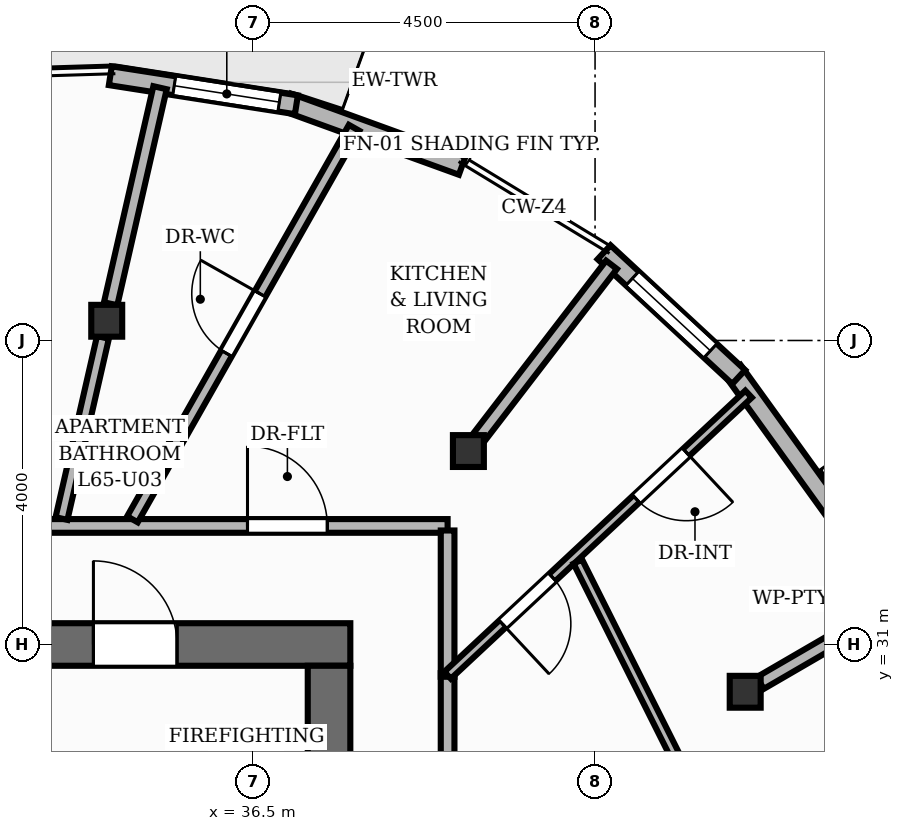
"""IFC4 building model, lengths in metres.
Left out: names, types, materials, properties, quantities, classifications, styles, units other than length and angle.
Written with IfcOpenShell. Run it as: python <this file> out.ifc"""

import sys

from ifc_helpers import new_model, si_unit, direction, frame, frame_2d, origin, origin_2d, place, context, subcontext, project, spatial, rectangle, i_section, extrude, element, fill, save


model = new_model("IFC4")
c1 = context("Model", 3, precision=1e-05, world=origin(), true_north=direction((0.0, 1.0)))
c2 = subcontext(c1, "Body", "Model", "MODEL_VIEW")
j1 = project(units=[si_unit("LENGTHUNIT", "METRE"), si_unit("PLANEANGLEUNIT", "RADIAN")], contexts=[c1])
p1 = place(None, origin())
s1 = spatial("IfcSite", under=j1, at=p1, CompositionType="ELEMENT")
p2 = place(p1, origin())
s2 = spatial("IfcBuilding", under=s1, at=p2, CompositionType="ELEMENT")
p3 = place(p2, frame((0.0, 0.0, 217.44)))
s3 = spatial("IfcBuildingStorey", under=s2, at=p3, CompositionType="ELEMENT", Elevation=217.44)
p4 = place(p3, frame((26.22, 31.0, 0.0), z_axis=(0.0, 0.0, 1.0), x_axis=(1.0, 0.0, 0.0)))
e1 = element("IfcWall", 1, at=p4, inside=s3, PredefinedType="SHEAR", context=c2, shape_type="SweptSolid", body=[
    extrude(rectangle(XDim=11.56, YDim=0.56, at=frame_2d((5.78, 0.0))), origin(), (0.0, 0.0, 1.0), 3.2),
])
p5 = place(p4, frame((8.18, 0.0, 0.0)))
e2 = element("IfcOpeningElement", 2, at=p5, cuts=e1, PredefinedType="OPENING", context=c2, shape_type="SweptSolid", body=[
    extrude(rectangle(XDim=1.1, YDim=2.15, at=frame_2d((0.55, 1.075))), frame((0.0, 0.29, 0.0), z_axis=(0.0, -1.0, 0.0), x_axis=(1.0, 0.0, 0.0)), (0.0, 0.0, 1.0), 0.58),
])
p6 = place(p4, frame((0.805, 0.0, 0.0)))
e3 = element("IfcOpeningElement", 3, at=p6, cuts=e1, PredefinedType="OPENING", context=c2, shape_type="SweptSolid", body=[
    extrude(rectangle(XDim=1.05, YDim=2.15, at=frame_2d((0.525, 1.075))), frame((0.0, 0.29, 0.0), z_axis=(0.0, -1.0, 0.0), x_axis=(1.0, 0.0, 0.0)), (0.0, 0.0, 1.0), 0.58),
])
p7 = place(p4, frame((2.555, 0.0, 0.0)))
e4 = element("IfcOpeningElement", 4, at=p7, cuts=e1, PredefinedType="OPENING", context=c2, shape_type="SweptSolid", body=[
    extrude(rectangle(XDim=1.05, YDim=2.15, at=frame_2d((0.525, 1.075))), frame((0.0, 0.29, 0.0), z_axis=(0.0, -1.0, 0.0), x_axis=(1.0, 0.0, 0.0)), (0.0, 0.0, 1.0), 0.58),
])
p8 = place(p4, frame((4.305, 0.0, 0.0)))
e5 = element("IfcOpeningElement", 5, at=p8, cuts=e1, PredefinedType="OPENING", context=c2, shape_type="SweptSolid", body=[
    extrude(rectangle(XDim=1.05, YDim=2.15, at=frame_2d((0.525, 1.075))), frame((0.0, 0.29, 0.0), z_axis=(0.0, -1.0, 0.0), x_axis=(1.0, 0.0, 0.0)), (0.0, 0.0, 1.0), 0.58),
])
p9 = place(p3, frame((37.5, 17.28, 0.0), z_axis=(0.0, 0.0, 1.0), x_axis=(0.0, 1.0, 0.0)))
e6 = element("IfcWall", 6, at=p9, inside=s3, PredefinedType="SHEAR", context=c2, shape_type="SweptSolid", body=[
    extrude(rectangle(XDim=13.44, YDim=0.56, at=frame_2d((6.72, 0.0))), origin(), (0.0, 0.0, 1.0), 3.2),
])
for number, where, z_axis, x_axis in (
    (7, (42.975, 30.378, 0.0), (0.0, 0.0, 1.0), (1.0, 0.0, 0.0)),
    (8, (39.333, 33.545, 0.0), (0.0, 0.0, 1.0), (1.0, 0.0, 0.0)),
    (9, (34.575, 35.26, 0.0), (0.0, 0.0, 1.0), (1.0, 0.0, 0.0)),
):
    element("IfcColumn", number, at=place(p3, frame(where, z_axis=z_axis, x_axis=x_axis)), inside=s3, PredefinedType="COLUMN", context=c2, shape_type="SweptSolid", body=[
        extrude(i_section(OverallWidth=0.407, OverallDepth=0.419, WebThickness=0.031, FlangeThickness=0.049, at=origin_2d()), origin(), (0.0, 0.0, 1.0), 3.2),
    ])
p10 = place(p3, frame((36.96, 38.13, 0.0), z_axis=(0.0, 0.0, 1.0), x_axis=(0.939954186413, -0.341300640851, 0.0)))
e10 = element("IfcWall", 10, at=p10, inside=s3, PredefinedType="SOLIDWALL", context=c2, shape_type="SweptSolid", body=[
    extrude(rectangle(XDim=2.437, YDim=0.25, at=frame_2d((1.219, 0.0))), origin(), (0.0, 0.0, 1.0), 2.96),
])
p11 = place(p3, frame((34.622, 38.484, 0.0), z_axis=(0.0, 0.0, 1.0), x_axis=(0.988040195026, -0.154196540209, 0.0)))
e11 = element("IfcWall", 11, at=p11, inside=s3, PredefinedType="SOLIDWALL", context=c2, shape_type="SweptSolid", body=[
    extrude(rectangle(XDim=2.478, YDim=0.25, at=frame_2d((1.239, 0.0))), origin(), (0.0, 0.0, 1.0), 2.96),
])
p12 = place(p11, frame((0.851, 0.0, 0.85)))
e12 = element("IfcOpeningElement", 12, at=p12, cuts=e11, PredefinedType="OPENING", context=c2, shape_type="SweptSolid", body=[
    extrude(rectangle(XDim=1.4, YDim=1.52, at=frame_2d((0.7, 0.76))), frame((0.0, 0.135, 0.0), z_axis=(0.0, -1.0, 0.0), x_axis=(1.0, 0.0, 0.0)), (0.0, 0.0, 1.0), 0.27),
])
p13 = place(p3, frame((42.814, 34.605, 0.0), z_axis=(0.0, 0.0, 1.0), x_axis=(0.584824573101, -0.811159798497, 0.0)))
e13 = element("IfcWall", 13, at=p13, inside=s3, PredefinedType="SOLIDWALL", context=c2, shape_type="SweptSolid", body=[
    extrude(rectangle(XDim=2.437, YDim=0.25, at=frame_2d((1.218, 0.0))), origin(), (0.0, 0.0, 1.0), 2.96),
])
p14 = place(p3, frame((41.119, 36.161, 0.0), z_axis=(0.0, 0.0, 1.0), x_axis=(0.733441361842, -0.679752726173, 0.0)))
e14 = element("IfcWall", 14, at=p14, inside=s3, PredefinedType="SOLIDWALL", context=c2, shape_type="SweptSolid", body=[
    extrude(rectangle(XDim=2.415, YDim=0.25, at=frame_2d((1.207, 0.0))), origin(), (0.0, 0.0, 1.0), 2.96),
])
p15 = place(p14, frame((0.507, 0.0, 0.85)))
e15 = element("IfcOpeningElement", 15, at=p15, cuts=e14, PredefinedType="OPENING", context=c2, shape_type="SweptSolid", body=[
    extrude(rectangle(XDim=1.4, YDim=1.55, at=frame_2d((0.7, 0.775))), frame((0.0, 0.135, 0.0), z_axis=(0.0, -1.0, 0.0), x_axis=(1.0, 0.0, 0.0)), (0.0, 0.0, 1.0), 0.27),
])
p16 = place(p3, frame((43.174, 30.493, 0.0), z_axis=(0.0, 0.0, 1.0), x_axis=(0.864637155841, 0.502396843879, 0.0)))
e16 = element("IfcWall", 16, at=p16, inside=s3, PredefinedType="PARTITIONING", context=c2, shape_type="SweptSolid", body=[
    extrude(rectangle(XDim=1.803, YDim=0.18, at=frame_2d((0.901, 0.0))), origin(), (0.0, 0.0, 1.0), 2.404),
])
p17 = place(p3, frame((39.473, 33.727, 0.0), z_axis=(0.0, 0.0, 1.0), x_axis=(0.609244614772, 0.792982344931, 0.0)))
e17 = element("IfcWall", 17, at=p17, inside=s3, PredefinedType="PARTITIONING", context=c2, shape_type="SweptSolid", body=[
    extrude(rectangle(XDim=2.861, YDim=0.18, at=frame_2d((1.43, 0.0))), origin(), (0.0, 0.0, 1.0), 2.404),
])
p18 = place(p3, frame((34.626, 35.483, 0.0), z_axis=(0.0, 0.0, 1.0), x_axis=(0.222945280676, 0.974830960641, 0.0)))
e18 = element("IfcWall", 18, at=p18, inside=s3, PredefinedType="PARTITIONING", context=c2, shape_type="SweptSolid", body=[
    extrude(rectangle(XDim=2.916, YDim=0.18, at=frame_2d((1.458, 0.0))), origin(), (0.0, 0.0, 1.0), 2.404),
])
p19 = place(p3, frame((39.06, 30.623, 0.0), z_axis=(0.0, 0.0, 1.0), x_axis=(0.0, -1.0, 0.0)))
e19 = element("IfcWall", 19, at=p19, inside=s3, PredefinedType="PARTITIONING", context=c2, shape_type="SweptSolid", body=[
    extrude(rectangle(XDim=15.183, YDim=0.18, at=frame_2d((7.591, 0.0))), origin(), (0.0, 0.0, 1.0), 2.955),
])
p20 = place(p19, frame((8.656, 0.0, 0.0)))
e20 = element("IfcOpeningElement", 20, at=p20, cuts=e19, PredefinedType="OPENING", context=c2, shape_type="SweptSolid", body=[
    extrude(rectangle(XDim=1.05, YDim=2.15, at=frame_2d((0.525, 1.075))), frame((0.0, 0.1, 0.0), z_axis=(0.0, -1.0, 0.0), x_axis=(1.0, 0.0, 0.0)), (0.0, 0.0, 1.0), 0.2),
])
p21 = place(p3, frame((33.2, 32.56, 0.0), z_axis=(0.0, 0.0, 1.0), x_axis=(1.0, 0.0, 0.0)))
e21 = element("IfcWall", 21, at=p21, inside=s3, PredefinedType="PARTITIONING", context=c2, shape_type="SweptSolid", body=[
    extrude(rectangle(XDim=5.86, YDim=0.18, at=frame_2d((2.93, 0.0))), origin(), (0.0, 0.0, 1.0), 2.955),
])
p22 = place(p21, frame((3.227, 0.0, 0.0)))
e22 = element("IfcOpeningElement", 22, at=p22, cuts=e21, PredefinedType="OPENING", context=c2, shape_type="SweptSolid", body=[
    extrude(rectangle(XDim=1.05, YDim=2.15, at=frame_2d((0.525, 1.075))), frame((0.0, 0.1, 0.0), z_axis=(0.0, -1.0, 0.0), x_axis=(1.0, 0.0, 0.0)), (0.0, 0.0, 1.0), 0.2),
])
p23 = place(p3, frame((39.06, 32.5, 0.0), z_axis=(0.0, 0.0, 1.0), x_axis=(0.0, -1.0, 0.0)))
e23 = element("IfcWall", 23, at=p23, inside=s3, PredefinedType="PARTITIONING", context=c2, shape_type="SweptSolid", body=[
    extrude(rectangle(XDim=1.925, YDim=0.18, at=frame_2d((0.962, 0.0))), origin(), (0.0, 0.0, 1.0), 2.955),
])
p24 = place(p3, frame((34.914, 32.647, 0.0), z_axis=(0.0, 0.0, 1.0), x_axis=(0.492777372346, 0.870155423648, 0.0)))
e24 = element("IfcWall", 24, at=p24, inside=s3, PredefinedType="PLUMBINGWALL", context=c2, shape_type="SweptSolid", body=[
    extrude(rectangle(XDim=5.919, YDim=0.16, at=frame_2d((2.96, 0.0))), origin(), (0.0, 0.0, 1.0), 2.692),
])
p25 = place(p24, frame((2.51, 0.0, 0.0)))
e25 = element("IfcOpeningElement", 25, at=p25, cuts=e24, PredefinedType="OPENING", context=c2, shape_type="SweptSolid", body=[
    extrude(rectangle(XDim=0.9, YDim=2.1, at=frame_2d((0.45, 1.05))), frame((0.0, 0.09, 0.0), z_axis=(0.0, -1.0, 0.0), x_axis=(1.0, 0.0, 0.0)), (0.0, 0.0, 1.0), 0.18),
])
p26 = place(p3, frame((43.02, 34.294, 0.0), z_axis=(0.0, 0.0, 1.0), x_axis=(-0.730757039427, -0.682637641307, 0.0)))
e26 = element("IfcWall", 26, at=p26, inside=s3, PredefinedType="PARTITIONING", context=c2, shape_type="SweptSolid", body=[
    extrude(rectangle(XDim=5.419, YDim=0.125, at=frame_2d((2.709, 0.0))), origin(), (0.0, 0.0, 1.0), 2.955),
])
p27 = place(p26, frame((1.122, 0.0, 0.0)))
e27 = element("IfcOpeningElement", 27, at=p27, cuts=e26, PredefinedType="OPENING", context=c2, shape_type="SweptSolid", body=[
    extrude(rectangle(XDim=0.9, YDim=2.1, at=frame_2d((0.45, 1.05))), frame((0.0, 0.073, 0.0), z_axis=(0.0, -1.0, 0.0), x_axis=(1.0, 0.0, 0.0)), (0.0, 0.0, 1.0), 0.145),
])
p28 = place(p26, frame((3.531, 0.0, 0.0)))
e28 = element("IfcOpeningElement", 28, at=p28, cuts=e26, PredefinedType="OPENING", context=c2, shape_type="SweptSolid", body=[
    extrude(rectangle(XDim=0.9, YDim=2.1, at=frame_2d((0.45, 1.05))), frame((0.0, 0.073, 0.0), z_axis=(0.0, -1.0, 0.0), x_axis=(1.0, 0.0, 0.0)), (0.0, 0.0, 1.0), 0.145),
])
p29 = place(p3, frame((33.98, 32.657, 0.0), z_axis=(0.0, 0.0, 1.0), x_axis=(0.223006482474, 0.974816961678, 0.0)))
e29 = element("IfcWall", 29, at=p29, inside=s3, PredefinedType="PLUMBINGWALL", context=c2, shape_type="SweptSolid", body=[
    extrude(rectangle(XDim=2.445, YDim=0.16, at=frame_2d((1.222, 0.0))), origin(), (0.0, 0.0, 1.0), 2.404),
])
p30 = place(p3, frame((43.768, 26.114, 0.0), z_axis=(0.0, 0.0, 1.0), x_axis=(-0.447958394428, 0.894054403748, 0.0)))
e30 = element("IfcWall", 30, at=p30, inside=s3, PredefinedType="PARTITIONING", context=c2, shape_type="SweptSolid", body=[
    extrude(rectangle(XDim=6.686, YDim=0.125, at=frame_2d((3.343, 0.0))), origin(), (0.0, 0.0, 1.0), 2.488),
])
p31 = place(p12, origin())
e31 = element("IfcWindow", 31, at=p31, inside=s3, PartitioningType="SINGLE_PANEL", PredefinedType="WINDOW", context=c2, shape_type="SweptSolid", body=[
    extrude(rectangle(XDim=1.4, YDim=1.52, at=frame_2d((0.7, 0.76))), frame((0.0, 0.03, 0.0), z_axis=(0.0, -1.0, 0.0), x_axis=(1.0, 0.0, 0.0)), (0.0, 0.0, 1.0), 0.06),
])
fill(e12, e31)
p32 = place(p15, origin())
e32 = element("IfcWindow", 32, at=p32, inside=s3, PartitioningType="SINGLE_PANEL", PredefinedType="WINDOW", context=c2, shape_type="SweptSolid", body=[
    extrude(rectangle(XDim=1.4, YDim=1.55, at=frame_2d((0.7, 0.775))), frame((0.0, 0.03, 0.0), z_axis=(0.0, -1.0, 0.0), x_axis=(1.0, 0.0, 0.0)), (0.0, 0.0, 1.0), 0.06),
])
fill(e15, e32)
p33 = place(p5, origin())
e33 = element("IfcDoor", 33, at=p33, inside=s3, OperationType="SINGLE_SWING_LEFT", PredefinedType="DOOR", context=c2, shape_type="SweptSolid", body=[
    extrude(rectangle(XDim=1.1, YDim=2.15, at=frame_2d((0.55, 1.075))), frame((0.0, 0.025, 0.0), z_axis=(0.0, -1.0, 0.0), x_axis=(1.0, 0.0, 0.0)), (0.0, 0.0, 1.0), 0.05),
])
fill(e2, e33)
p34 = place(p22, origin())
e34 = element("IfcDoor", 34, at=p34, inside=s3, OperationType="SINGLE_SWING_LEFT", PredefinedType="DOOR", context=c2, shape_type="SweptSolid", body=[
    extrude(rectangle(XDim=1.05, YDim=2.15, at=frame_2d((0.525, 1.075))), frame((0.0, 0.025, 0.0), z_axis=(0.0, -1.0, 0.0), x_axis=(1.0, 0.0, 0.0)), (0.0, 0.0, 1.0), 0.05),
])
fill(e22, e34)
p35 = place(p25, origin())
e35 = element("IfcDoor", 35, at=p35, inside=s3, OperationType="SINGLE_SWING_RIGHT", PredefinedType="DOOR", context=c2, shape_type="SweptSolid", body=[
    extrude(rectangle(XDim=0.9, YDim=2.1, at=frame_2d((0.45, 1.05))), frame((0.0, 0.025, 0.0), z_axis=(0.0, -1.0, 0.0), x_axis=(1.0, 0.0, 0.0)), (0.0, 0.0, 1.0), 0.05),
])
fill(e25, e35)
p36 = place(p27, origin())
e36 = element("IfcDoor", 36, at=p36, inside=s3, OperationType="SINGLE_SWING_LEFT", PredefinedType="DOOR", context=c2, shape_type="SweptSolid", body=[
    extrude(rectangle(XDim=0.9, YDim=2.1, at=frame_2d((0.45, 1.05))), frame((0.0, 0.025, 0.0), z_axis=(0.0, -1.0, 0.0), x_axis=(1.0, 0.0, 0.0)), (0.0, 0.0, 1.0), 0.05),
])
fill(e27, e36)
p37 = place(p28, origin())
e37 = element("IfcDoor", 37, at=p37, inside=s3, OperationType="SINGLE_SWING_RIGHT", PredefinedType="DOOR", context=c2, shape_type="SweptSolid", body=[
    extrude(rectangle(XDim=0.9, YDim=2.1, at=frame_2d((0.45, 1.05))), frame((0.0, 0.025, 0.0), z_axis=(0.0, -1.0, 0.0), x_axis=(1.0, 0.0, 0.0)), (0.0, 0.0, 1.0), 0.05),
])
fill(e28, e37)
save(model, sys.argv[1])
